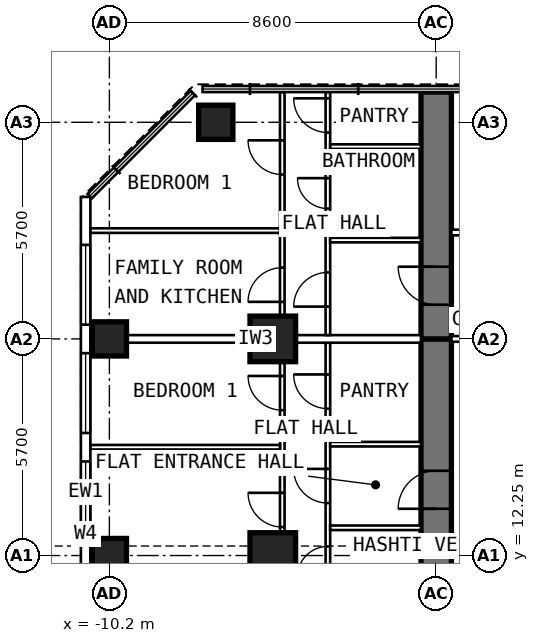
"""IFC4 building model, lengths in metres.
Left out: names, types, materials, properties, quantities, classifications, styles, units other than length and angle.
Written with IfcOpenShell. Run it as: python <this file> out.ifc"""

import sys

from ifc_helpers import new_model, si_unit, direction, frame, frame_2d, origin, origin_2d, place, context, subcontext, project, spatial, rectangle, extrude, element, fill, save


model = new_model("IFC4")
c1 = context("Model", 3, precision=1e-05, world=origin(), true_north=direction((0.0, 1.0)))
c2 = subcontext(c1, "Body", "Model", "MODEL_VIEW")
j1 = project(units=[si_unit("LENGTHUNIT", "METRE"), si_unit("PLANEANGLEUNIT", "RADIAN")], contexts=[c1])
p1 = place(None, origin())
s1 = spatial("IfcSite", under=j1, at=p1, CompositionType="ELEMENT")
p2 = place(p1, origin())
s2 = spatial("IfcBuilding", under=s1, at=p2, CompositionType="ELEMENT")
p3 = place(p2, frame((0.0, 0.0, 149.0)))
s3 = spatial("IfcBuildingStorey", under=s2, at=p3, CompositionType="ELEMENT", Elevation=149.0)
for number, where, z_axis, x_axis in (
    (1, (-10.2, 12.25, 0.0), (0.0, 0.0, 1.0), (0.0, 1.0, 0.0)),
    (2, (-10.2, 17.95, 0.0), (0.0, 0.0, 1.0), (0.0, 1.0, 0.0)),
    (3, (-7.4, 23.65, 0.0), (0.0, 0.0, 1.0), (0.0, 1.0, 0.0)),
):
    element("IfcColumn", number, at=place(p3, frame(where, z_axis=z_axis, x_axis=x_axis)), inside=s3, PredefinedType="COLUMN", context=c2, shape_type="SweptSolid", body=[
        extrude(rectangle(XDim=0.9, YDim=0.9, at=origin_2d()), origin(), (0.0, 0.0, 1.0), 3.6),
    ])
for number, where, z_axis, x_axis in (
    (4, (-5.9, 12.25, 0.0), (0.0, 0.0, 1.0), (0.0, 1.0, 0.0)),
    (5, (-5.9, 17.95, 0.0), (0.0, 0.0, 1.0), (0.0, 1.0, 0.0)),
):
    element("IfcColumn", number, at=place(p3, frame(where, z_axis=z_axis, x_axis=x_axis)), inside=s3, PredefinedType="COLUMN", context=c2, shape_type="SweptSolid", body=[
        extrude(rectangle(XDim=1.2, YDim=1.2, at=origin_2d()), origin(), (0.0, 0.0, 1.0), 3.6),
    ])
p4 = place(p3, frame((-1.6, 9.6, 0.0), z_axis=(0.0, 0.0, 1.0), x_axis=(0.0, 1.0, 0.0)))
e6 = element("IfcWall", 6, at=p4, inside=s3, PredefinedType="SHEAR", context=c2, shape_type="SweptSolid", body=[
    extrude(rectangle(XDim=8.35, YDim=0.8, at=frame_2d((4.175, 0.0))), origin(), (0.0, 0.0, 1.0), 3.6),
])
p5 = place(p4, frame((3.88, 0.0, 0.0)))
e7 = element("IfcOpeningElement", 7, at=p5, cuts=e6, PredefinedType="OPENING", context=c2, shape_type="SweptSolid", body=[
    extrude(rectangle(XDim=1.0, YDim=2.1, at=frame_2d((0.5, 1.05))), frame((0.0, 0.412, 0.0), z_axis=(0.0, -1.0, 0.0), x_axis=(1.0, 0.0, 0.0)), (0.0, 0.0, 1.0), 0.824),
])
p6 = place(p3, frame((-1.6, 17.95, 0.0), z_axis=(0.0, 0.0, 1.0), x_axis=(0.0, 1.0, 0.0)))
e8 = element("IfcWall", 8, at=p6, inside=s3, PredefinedType="SHEAR", context=c2, shape_type="SweptSolid", body=[
    extrude(rectangle(XDim=6.495, YDim=0.8, at=frame_2d((3.248, 0.0))), origin(), (0.0, 0.0, 1.0), 3.6),
])
p7 = place(p6, frame((0.9, 0.0, 0.0)))
e9 = element("IfcOpeningElement", 9, at=p7, cuts=e8, PredefinedType="OPENING", context=c2, shape_type="SweptSolid", body=[
    extrude(rectangle(XDim=1.0, YDim=2.1, at=frame_2d((0.5, 1.05))), frame((0.0, 0.412, 0.0), z_axis=(0.0, -1.0, 0.0), x_axis=(1.0, 0.0, 0.0)), (0.0, 0.0, 1.0), 0.824),
])
p8 = place(p3, frame((-10.825, 6.148, 0.0), z_axis=(0.0, 0.0, 1.0), x_axis=(0.0, 1.0, 0.0)))
e10 = element("IfcWall", 10, at=p8, inside=s3, PredefinedType="SOLIDWALL", context=c2, shape_type="SweptSolid", body=[
    extrude(rectangle(XDim=15.537, YDim=0.25, at=frame_2d((7.769, 0.0))), origin(), (0.0, 0.0, 1.0), 3.35),
])
p9 = place(p8, frame((0.777, 0.0, 0.8)))
e11 = element("IfcOpeningElement", 11, at=p9, cuts=e10, PredefinedType="OPENING", context=c2, shape_type="SweptSolid", body=[
    extrude(rectangle(XDim=2.1, YDim=1.8, at=frame_2d((1.05, 0.9))), frame((0.0, 0.137, 0.0), z_axis=(0.0, -1.0, 0.0), x_axis=(1.0, 0.0, 0.0)), (0.0, 0.0, 1.0), 0.274),
])
p10 = place(p8, frame((3.627, 0.0, 0.8)))
e12 = element("IfcOpeningElement", 12, at=p10, cuts=e10, PredefinedType="OPENING", context=c2, shape_type="SweptSolid", body=[
    extrude(rectangle(XDim=2.1, YDim=1.8, at=frame_2d((1.05, 0.9))), frame((0.0, 0.137, 0.0), z_axis=(0.0, -1.0, 0.0), x_axis=(1.0, 0.0, 0.0)), (0.0, 0.0, 1.0), 0.274),
])
p11 = place(p8, frame((6.477, 0.0, 0.8)))
e13 = element("IfcOpeningElement", 13, at=p11, cuts=e10, PredefinedType="OPENING", context=c2, shape_type="SweptSolid", body=[
    extrude(rectangle(XDim=2.1, YDim=1.8, at=frame_2d((1.05, 0.9))), frame((0.0, 0.137, 0.0), z_axis=(0.0, -1.0, 0.0), x_axis=(1.0, 0.0, 0.0)), (0.0, 0.0, 1.0), 0.274),
])
p12 = place(p8, frame((9.327, 0.0, 0.8)))
e14 = element("IfcOpeningElement", 14, at=p12, cuts=e10, PredefinedType="OPENING", context=c2, shape_type="SweptSolid", body=[
    extrude(rectangle(XDim=2.1, YDim=1.8, at=frame_2d((1.05, 0.9))), frame((0.0, 0.137, 0.0), z_axis=(0.0, -1.0, 0.0), x_axis=(1.0, 0.0, 0.0)), (0.0, 0.0, 1.0), 0.274),
])
p13 = place(p8, frame((12.177, 0.0, 0.8)))
e15 = element("IfcOpeningElement", 15, at=p13, cuts=e10, PredefinedType="OPENING", context=c2, shape_type="SweptSolid", body=[
    extrude(rectangle(XDim=2.1, YDim=1.8, at=frame_2d((1.05, 0.9))), frame((0.0, 0.137, 0.0), z_axis=(0.0, -1.0, 0.0), x_axis=(1.0, 0.0, 0.0)), (0.0, 0.0, 1.0), 0.274),
])
p14 = place(p3, frame((-4.45, 10.05, 0.0), z_axis=(0.0, 0.0, 1.0), x_axis=(0.0, 1.0, 0.0)))
e16 = element("IfcWall", 16, at=p14, inside=s3, PredefinedType="PARTITIONING", context=c2, shape_type="SweptSolid", body=[
    extrude(rectangle(XDim=7.8, YDim=0.12, at=frame_2d((3.9, 0.0))), origin(), (0.0, 0.0, 1.0), 3.35),
])
p15 = place(p14, frame((1.64, 0.0, 0.0)))
e17 = element("IfcOpeningElement", 17, at=p15, cuts=e16, PredefinedType="OPENING", context=c2, shape_type="SweptSolid", body=[
    extrude(rectangle(XDim=0.8, YDim=2.1, at=frame_2d((0.4, 1.05))), frame((0.0, 0.072, 0.0), z_axis=(0.0, -1.0, 0.0), x_axis=(1.0, 0.0, 0.0)), (0.0, 0.0, 1.0), 0.144),
])
p16 = place(p14, frame((3.58, 0.0, 0.0)))
e18 = element("IfcOpeningElement", 18, at=p16, cuts=e16, PredefinedType="OPENING", context=c2, shape_type="SweptSolid", body=[
    extrude(rectangle(XDim=0.9, YDim=2.1, at=frame_2d((0.45, 1.05))), frame((0.0, 0.072, 0.0), z_axis=(0.0, -1.0, 0.0), x_axis=(1.0, 0.0, 0.0)), (0.0, 0.0, 1.0), 0.144),
])
p17 = place(p14, frame((6.065, 0.0, 0.0)))
e19 = element("IfcOpeningElement", 19, at=p17, cuts=e16, PredefinedType="OPENING", context=c2, shape_type="SweptSolid", body=[
    extrude(rectangle(XDim=0.9, YDim=2.1, at=frame_2d((0.45, 1.05))), frame((0.0, 0.072, 0.0), z_axis=(0.0, -1.0, 0.0), x_axis=(1.0, 0.0, 0.0)), (0.0, 0.0, 1.0), 0.144),
])
p18 = place(p3, frame((-5.65, 9.6, 0.0), z_axis=(0.0, 0.0, 1.0), x_axis=(0.0, 1.0, 0.0)))
e20 = element("IfcWall", 20, at=p18, inside=s3, PredefinedType="PARTITIONING", context=c2, shape_type="SweptSolid", body=[
    extrude(rectangle(XDim=8.1, YDim=0.12, at=frame_2d((4.05, 0.0))), origin(), (0.0, 0.0, 1.0), 3.35),
])
p19 = place(p18, frame((3.4, 0.0, 0.0)))
e21 = element("IfcOpeningElement", 21, at=p19, cuts=e20, PredefinedType="OPENING", context=c2, shape_type="SweptSolid", body=[
    extrude(rectangle(XDim=0.9, YDim=2.1, at=frame_2d((0.45, 1.05))), frame((0.0, 0.072, 0.0), z_axis=(0.0, -1.0, 0.0), x_axis=(1.0, 0.0, 0.0)), (0.0, 0.0, 1.0), 0.144),
])
p20 = place(p18, frame((6.475, 0.0, 0.0)))
e22 = element("IfcOpeningElement", 22, at=p20, cuts=e20, PredefinedType="OPENING", context=c2, shape_type="SweptSolid", body=[
    extrude(rectangle(XDim=0.9, YDim=2.1, at=frame_2d((0.45, 1.05))), frame((0.0, 0.072, 0.0), z_axis=(0.0, -1.0, 0.0), x_axis=(1.0, 0.0, 0.0)), (0.0, 0.0, 1.0), 0.144),
])
p21 = place(p3, frame((-5.71, 15.1, 0.0), z_axis=(0.0, 0.0, 1.0), x_axis=(-1.0, 0.0, 0.0)))
e23 = element("IfcWall", 23, at=p21, inside=s3, PredefinedType="PARTITIONING", context=c2, shape_type="SweptSolid", body=[
    extrude(rectangle(XDim=4.99, YDim=0.12, at=frame_2d((2.495, 0.0))), origin(), (0.0, 0.0, 1.0), 3.35),
])
for number, where, z_axis, x_axis in (
    (24, (-2.0, 12.98, 0.0), (0.0, 0.0, 1.0), (-1.0, 0.0, 0.0)),
    (25, (-2.0, 15.18, 0.0), (0.0, 0.0, 1.0), (-1.0, 0.0, 0.0)),
):
    element("IfcWall", number, at=place(p3, frame(where, z_axis=z_axis, x_axis=x_axis)), inside=s3, PredefinedType="PARTITIONING", context=c2, shape_type="SweptSolid", body=[
        extrude(rectangle(XDim=2.39, YDim=0.12, at=frame_2d((1.195, 0.0))), origin(), (0.0, 0.0, 1.0), 3.35),
    ])
p22 = place(p3, frame((-4.45, 18.05, 0.0), z_axis=(0.0, 0.0, 1.0), x_axis=(0.0, 1.0, 0.0)))
e26 = element("IfcWall", 26, at=p22, inside=s3, PredefinedType="PARTITIONING", context=c2, shape_type="SweptSolid", body=[
    extrude(rectangle(XDim=6.395, YDim=0.12, at=frame_2d((3.198, 0.0))), origin(), (0.0, 0.0, 1.0), 3.35),
])
p23 = place(p22, frame((0.75, 0.0, 0.0)))
e27 = element("IfcOpeningElement", 27, at=p23, cuts=e26, PredefinedType="OPENING", context=c2, shape_type="SweptSolid", body=[
    extrude(rectangle(XDim=0.9, YDim=2.1, at=frame_2d((0.45, 1.05))), frame((0.0, 0.072, 0.0), z_axis=(0.0, -1.0, 0.0), x_axis=(1.0, 0.0, 0.0)), (0.0, 0.0, 1.0), 0.144),
])
p24 = place(p22, frame((3.33, 0.0, 0.0)))
e28 = element("IfcOpeningElement", 28, at=p24, cuts=e26, PredefinedType="OPENING", context=c2, shape_type="SweptSolid", body=[
    extrude(rectangle(XDim=0.8, YDim=2.1, at=frame_2d((0.4, 1.05))), frame((0.0, 0.072, 0.0), z_axis=(0.0, -1.0, 0.0), x_axis=(1.0, 0.0, 0.0)), (0.0, 0.0, 1.0), 0.144),
])
p25 = place(p22, frame((5.33, 0.0, 0.0)))
e29 = element("IfcOpeningElement", 29, at=p25, cuts=e26, PredefinedType="OPENING", context=c2, shape_type="SweptSolid", body=[
    extrude(rectangle(XDim=0.9, YDim=2.1, at=frame_2d((0.45, 1.05))), frame((0.0, 0.072, 0.0), z_axis=(0.0, -1.0, 0.0), x_axis=(1.0, 0.0, 0.0)), (0.0, 0.0, 1.0), 0.144),
])
p26 = place(p3, frame((-5.65, 18.05, 0.0), z_axis=(0.0, 0.0, 1.0), x_axis=(0.0, 1.0, 0.0)))
e30 = element("IfcWall", 30, at=p26, inside=s3, PredefinedType="PARTITIONING", context=c2, shape_type="SweptSolid", body=[
    extrude(rectangle(XDim=6.395, YDim=0.12, at=frame_2d((3.198, 0.0))), origin(), (0.0, 0.0, 1.0), 3.35),
])
p27 = place(p26, frame((0.875, 0.0, 0.0)))
e31 = element("IfcOpeningElement", 31, at=p27, cuts=e30, PredefinedType="OPENING", context=c2, shape_type="SweptSolid", body=[
    extrude(rectangle(XDim=0.9, YDim=2.1, at=frame_2d((0.45, 1.05))), frame((0.0, 0.072, 0.0), z_axis=(0.0, -1.0, 0.0), x_axis=(1.0, 0.0, 0.0)), (0.0, 0.0, 1.0), 0.144),
])
p28 = place(p26, frame((4.225, 0.0, 0.0)))
e32 = element("IfcOpeningElement", 32, at=p28, cuts=e30, PredefinedType="OPENING", context=c2, shape_type="SweptSolid", body=[
    extrude(rectangle(XDim=0.9, YDim=2.1, at=frame_2d((0.45, 1.05))), frame((0.0, 0.072, 0.0), z_axis=(0.0, -1.0, 0.0), x_axis=(1.0, 0.0, 0.0)), (0.0, 0.0, 1.0), 0.144),
])
p29 = place(p3, frame((-5.71, 20.8, 0.0), z_axis=(0.0, 0.0, 1.0), x_axis=(-1.0, 0.0, 0.0)))
e33 = element("IfcWall", 33, at=p29, inside=s3, PredefinedType="PARTITIONING", context=c2, shape_type="SweptSolid", body=[
    extrude(rectangle(XDim=4.99, YDim=0.12, at=frame_2d((2.495, 0.0))), origin(), (0.0, 0.0, 1.0), 3.35),
])
for number, where, z_axis, x_axis in (
    (34, (-2.0, 20.55, 0.0), (0.0, 0.0, 1.0), (-1.0, 0.0, 0.0)),
    (35, (-2.0, 23.01, 0.0), (0.0, 0.0, 1.0), (-1.0, 0.0, 0.0)),
):
    element("IfcWall", number, at=place(p3, frame(where, z_axis=z_axis, x_axis=x_axis)), inside=s3, PredefinedType="PARTITIONING", context=c2, shape_type="SweptSolid", body=[
        extrude(rectangle(XDim=2.39, YDim=0.12, at=frame_2d((1.195, 0.0))), origin(), (0.0, 0.0, 1.0), 3.35),
    ])
p30 = place(p3, frame((-2.0, 17.95, 0.0), z_axis=(0.0, 0.0, 1.0), x_axis=(-1.0, 0.0, 0.0)))
e36 = element("IfcWall", 36, at=p30, inside=s3, PredefinedType="PARTITIONING", context=c2, shape_type="SweptSolid", body=[
    extrude(rectangle(XDim=8.7, YDim=0.2, at=frame_2d((4.35, 0.0))), origin(), (0.0, 0.0, 1.0), 2.45),
])
p31 = place(p3, frame((1.2, 20.75, 0.0), z_axis=(0.0, 0.0, 1.0), x_axis=(-1.0, 0.0, 0.0)))
e37 = element("IfcWall", 37, at=p31, inside=s3, PredefinedType="PARTITIONING", context=c2, shape_type="SweptSolid", body=[
    extrude(rectangle(XDim=2.4, YDim=0.15, at=frame_2d((1.2, 0.0))), origin(), (0.0, 0.0, 1.0), 3.35),
])
p32 = place(p31, frame((0.7, 0.0, 0.0)))
e38 = element("IfcOpeningElement", 38, at=p32, cuts=e37, PredefinedType="OPENING", context=c2, shape_type="SweptSolid", body=[
    extrude(rectangle(XDim=1.0, YDim=2.1, at=frame_2d((0.5, 1.05))), frame((0.0, 0.087, 0.0), z_axis=(0.0, -1.0, 0.0), x_axis=(1.0, 0.0, 0.0)), (0.0, 0.0, 1.0), 0.174),
])
p33 = place(p3, frame((1.2, 17.95, 0.0), z_axis=(0.0, 0.0, 1.0), x_axis=(-1.0, 0.0, 0.0)))
e39 = element("IfcWall", 39, at=p33, inside=s3, PredefinedType="PARTITIONING", context=c2, shape_type="SweptSolid", body=[
    extrude(rectangle(XDim=2.4, YDim=0.15, at=frame_2d((1.2, 0.0))), origin(), (0.0, 0.0, 1.0), 3.35),
])
p34 = place(p33, frame((0.7, 0.0, 0.0)))
e40 = element("IfcOpeningElement", 40, at=p34, cuts=e39, PredefinedType="OPENING", context=c2, shape_type="SweptSolid", body=[
    extrude(rectangle(XDim=1.0, YDim=2.1, at=frame_2d((0.5, 1.05))), frame((0.0, 0.087, 0.0), z_axis=(0.0, -1.0, 0.0), x_axis=(1.0, 0.0, 0.0)), (0.0, 0.0, 1.0), 0.174),
])
p35 = place(p11, origin())
e41 = element("IfcWindow", 41, at=p35, inside=s3, PartitioningType="SINGLE_PANEL", PredefinedType="WINDOW", context=c2, shape_type="SweptSolid", body=[
    extrude(rectangle(XDim=2.1, YDim=1.8, at=frame_2d((1.05, 0.9))), frame((0.0, 0.03, 0.0), z_axis=(0.0, -1.0, 0.0), x_axis=(1.0, 0.0, 0.0)), (0.0, 0.0, 1.0), 0.06),
])
fill(e13, e41)
p36 = place(p12, origin())
e42 = element("IfcWindow", 42, at=p36, inside=s3, PartitioningType="SINGLE_PANEL", PredefinedType="WINDOW", context=c2, shape_type="SweptSolid", body=[
    extrude(rectangle(XDim=2.1, YDim=1.8, at=frame_2d((1.05, 0.9))), frame((0.0, 0.03, 0.0), z_axis=(0.0, -1.0, 0.0), x_axis=(1.0, 0.0, 0.0)), (0.0, 0.0, 1.0), 0.06),
])
fill(e14, e42)
p37 = place(p13, origin())
e43 = element("IfcWindow", 43, at=p37, inside=s3, PartitioningType="SINGLE_PANEL", PredefinedType="WINDOW", context=c2, shape_type="SweptSolid", body=[
    extrude(rectangle(XDim=2.1, YDim=1.8, at=frame_2d((1.05, 0.9))), frame((0.0, 0.03, 0.0), z_axis=(0.0, -1.0, 0.0), x_axis=(1.0, 0.0, 0.0)), (0.0, 0.0, 1.0), 0.06),
])
fill(e15, e43)
p38 = place(p5, origin())
e44 = element("IfcDoor", 44, at=p38, inside=s3, OperationType="SINGLE_SWING_LEFT", PredefinedType="DOOR", context=c2, shape_type="SweptSolid", body=[
    extrude(rectangle(XDim=1.0, YDim=2.1, at=frame_2d((0.5, 1.05))), frame((0.0, 0.15, 0.0), z_axis=(0.0, -1.0, 0.0), x_axis=(1.0, 0.0, 0.0)), (0.0, 0.0, 1.0), 0.3),
])
fill(e7, e44)
p39 = place(p19, origin())
e45 = element("IfcDoor", 45, at=p39, inside=s3, OperationType="SINGLE_SWING_RIGHT", PredefinedType="DOOR", context=c2, shape_type="SweptSolid", body=[
    extrude(rectangle(XDim=0.9, YDim=2.1, at=frame_2d((0.45, 1.05))), frame((0.0, 0.025, 0.0), z_axis=(0.0, -1.0, 0.0), x_axis=(1.0, 0.0, 0.0)), (0.0, 0.0, 1.0), 0.05),
])
fill(e21, e45)
p40 = place(p20, origin())
e46 = element("IfcDoor", 46, at=p40, inside=s3, OperationType="SINGLE_SWING_RIGHT", PredefinedType="DOOR", context=c2, shape_type="SweptSolid", body=[
    extrude(rectangle(XDim=0.9, YDim=2.1, at=frame_2d((0.45, 1.05))), frame((0.0, 0.025, 0.0), z_axis=(0.0, -1.0, 0.0), x_axis=(1.0, 0.0, 0.0)), (0.0, 0.0, 1.0), 0.05),
])
fill(e22, e46)
p41 = place(p15, origin())
e47 = element("IfcDoor", 47, at=p41, inside=s3, OperationType="SINGLE_SWING_LEFT", PredefinedType="DOOR", context=c2, shape_type="SweptSolid", body=[
    extrude(rectangle(XDim=0.8, YDim=2.1, at=frame_2d((0.4, 1.05))), frame((0.0, 0.025, 0.0), z_axis=(0.0, -1.0, 0.0), x_axis=(1.0, 0.0, 0.0)), (0.0, 0.0, 1.0), 0.05),
])
fill(e17, e47)
p42 = place(p16, origin())
e48 = element("IfcDoor", 48, at=p42, inside=s3, OperationType="SINGLE_SWING_RIGHT", PredefinedType="DOOR", context=c2, shape_type="SweptSolid", body=[
    extrude(rectangle(XDim=0.9, YDim=2.1, at=frame_2d((0.45, 1.05))), frame((0.0, 0.025, 0.0), z_axis=(0.0, -1.0, 0.0), x_axis=(1.0, 0.0, 0.0)), (0.0, 0.0, 1.0), 0.05),
])
fill(e18, e48)
p43 = place(p17, origin())
e49 = element("IfcDoor", 49, at=p43, inside=s3, OperationType="SINGLE_SWING_RIGHT", PredefinedType="DOOR", context=c2, shape_type="SweptSolid", body=[
    extrude(rectangle(XDim=0.9, YDim=2.1, at=frame_2d((0.45, 1.05))), frame((0.0, 0.025, 0.0), z_axis=(0.0, -1.0, 0.0), x_axis=(1.0, 0.0, 0.0)), (0.0, 0.0, 1.0), 0.05),
])
fill(e19, e49)
p44 = place(p7, origin())
e50 = element("IfcDoor", 50, at=p44, inside=s3, OperationType="SINGLE_SWING_RIGHT", PredefinedType="DOOR", context=c2, shape_type="SweptSolid", body=[
    extrude(rectangle(XDim=1.0, YDim=2.1, at=frame_2d((0.5, 1.05))), frame((0.0, 0.15, 0.0), z_axis=(0.0, -1.0, 0.0), x_axis=(1.0, 0.0, 0.0)), (0.0, 0.0, 1.0), 0.3),
])
fill(e9, e50)
p45 = place(p27, origin())
e51 = element("IfcDoor", 51, at=p45, inside=s3, OperationType="SINGLE_SWING_LEFT", PredefinedType="DOOR", context=c2, shape_type="SweptSolid", body=[
    extrude(rectangle(XDim=0.9, YDim=2.1, at=frame_2d((0.45, 1.05))), frame((0.0, 0.025, 0.0), z_axis=(0.0, -1.0, 0.0), x_axis=(1.0, 0.0, 0.0)), (0.0, 0.0, 1.0), 0.05),
])
fill(e31, e51)
p46 = place(p28, origin())
e52 = element("IfcDoor", 52, at=p46, inside=s3, OperationType="SINGLE_SWING_RIGHT", PredefinedType="DOOR", context=c2, shape_type="SweptSolid", body=[
    extrude(rectangle(XDim=0.9, YDim=2.1, at=frame_2d((0.45, 1.05))), frame((0.0, 0.025, 0.0), z_axis=(0.0, -1.0, 0.0), x_axis=(1.0, 0.0, 0.0)), (0.0, 0.0, 1.0), 0.05),
])
fill(e32, e52)
p47 = place(p23, origin())
e53 = element("IfcDoor", 53, at=p47, inside=s3, OperationType="SINGLE_SWING_LEFT", PredefinedType="DOOR", context=c2, shape_type="SweptSolid", body=[
    extrude(rectangle(XDim=0.9, YDim=2.1, at=frame_2d((0.45, 1.05))), frame((0.0, 0.025, 0.0), z_axis=(0.0, -1.0, 0.0), x_axis=(1.0, 0.0, 0.0)), (0.0, 0.0, 1.0), 0.05),
])
fill(e27, e53)
p48 = place(p24, origin())
e54 = element("IfcDoor", 54, at=p48, inside=s3, OperationType="SINGLE_SWING_RIGHT", PredefinedType="DOOR", context=c2, shape_type="SweptSolid", body=[
    extrude(rectangle(XDim=0.8, YDim=2.1, at=frame_2d((0.4, 1.05))), frame((0.0, 0.025, 0.0), z_axis=(0.0, -1.0, 0.0), x_axis=(1.0, 0.0, 0.0)), (0.0, 0.0, 1.0), 0.05),
])
fill(e28, e54)
p49 = place(p25, origin())
e55 = element("IfcDoor", 55, at=p49, inside=s3, OperationType="SINGLE_SWING_RIGHT", PredefinedType="DOOR", context=c2, shape_type="SweptSolid", body=[
    extrude(rectangle(XDim=0.9, YDim=2.1, at=frame_2d((0.45, 1.05))), frame((0.0, 0.025, 0.0), z_axis=(0.0, -1.0, 0.0), x_axis=(1.0, 0.0, 0.0)), (0.0, 0.0, 1.0), 0.05),
])
fill(e29, e55)
save(model, sys.argv[1])
